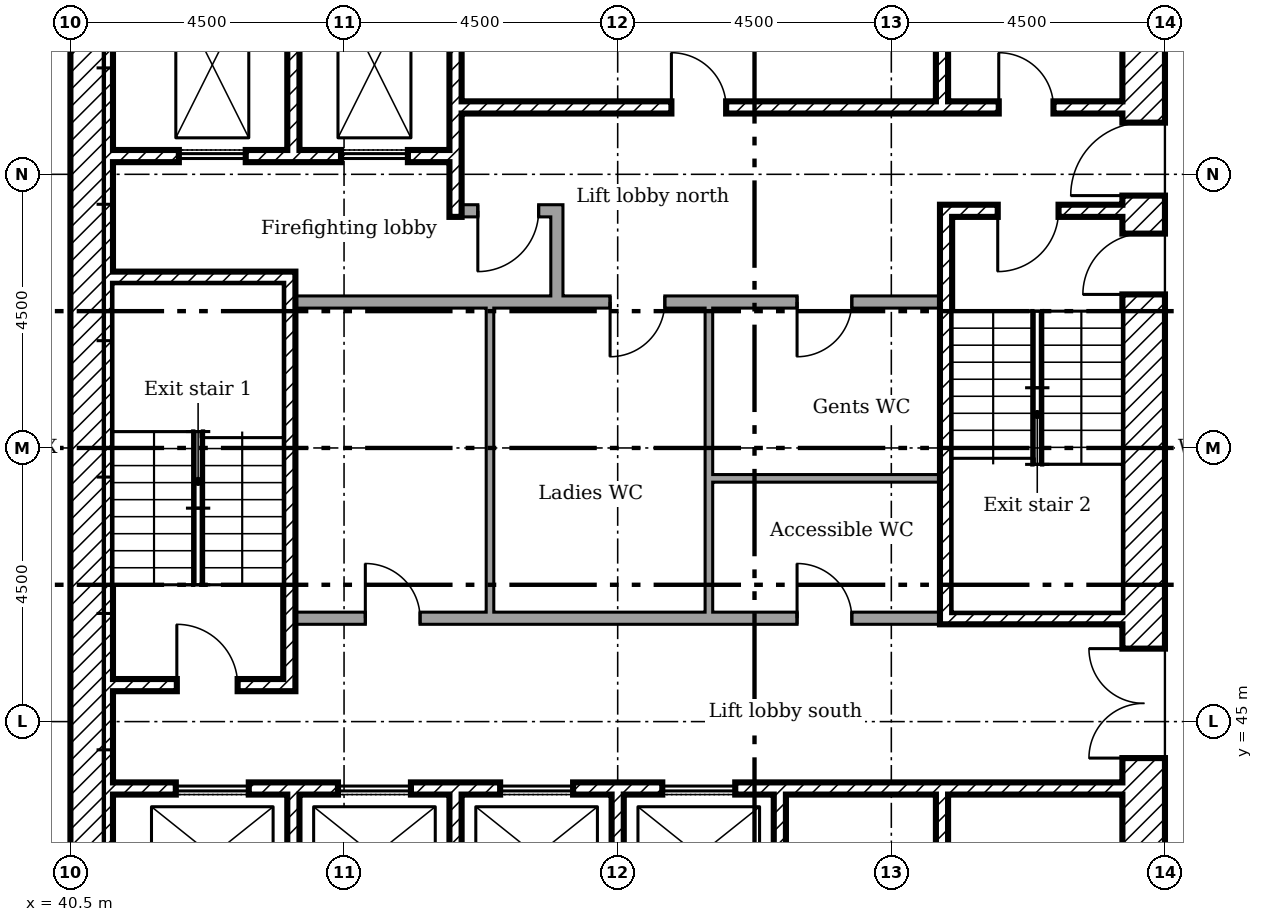
"""IFC4 building model, lengths in metres.
Left out: names, types, materials, properties, quantities, classifications, styles, units other than length and angle.
Written with IfcOpenShell. Run it as: python <this file> out.ifc"""

import sys

from ifc_helpers import new_model, si_unit, direction, frame, frame_2d, origin, place, context, subcontext, project, spatial, rectangle, extrude, element, fill, save


model = new_model("IFC4")
c1 = context("Model", 3, precision=1e-05, world=origin(), true_north=direction((0.0, 1.0)))
c2 = subcontext(c1, "Body", "Model", "MODEL_VIEW")
j1 = project(units=[si_unit("LENGTHUNIT", "METRE"), si_unit("PLANEANGLEUNIT", "RADIAN")], contexts=[c1])
p1 = place(None, origin())
s1 = spatial("IfcSite", under=j1, at=p1, CompositionType="ELEMENT")
p2 = place(p1, origin())
s2 = spatial("IfcBuilding", under=s1, at=p2, CompositionType="ELEMENT")
p3 = place(p2, frame((0.0, 0.0, 95.6)))
s3 = spatial("IfcBuildingStorey", under=s2, at=p3, CompositionType="ELEMENT", Elevation=95.6)
p4 = place(p3, frame((58.15, 40.5, 0.0), z_axis=(0.0, 0.0, 1.0), x_axis=(0.0, 1.0, 0.0)))
e1 = element("IfcWall", 1, at=p4, inside=s3, PredefinedType="SHEAR", context=c2, shape_type="SweptSolid", body=[
    extrude(rectangle(XDim=18.0, YDim=0.7, at=frame_2d((9.0, 0.0))), origin(), (0.0, 0.0, 1.0), 3.35),
])
p5 = place(p4, frame((13.15, 0.0, 0.0)))
e2 = element("IfcOpeningElement", 2, at=p5, cuts=e1, PredefinedType="OPENING", context=c2, shape_type="SweptSolid", body=[
    extrude(rectangle(XDim=1.2, YDim=2.1, at=frame_2d((0.6, 1.05))), frame((0.0, 0.36, 0.0), z_axis=(0.0, -1.0, 0.0), x_axis=(1.0, 0.0, 0.0)), (0.0, 0.0, 1.0), 0.72),
])
p6 = place(p4, frame((3.9, 0.0, 0.0)))
e3 = element("IfcOpeningElement", 3, at=p6, cuts=e1, PredefinedType="OPENING", context=c2, shape_type="SweptSolid", body=[
    extrude(rectangle(XDim=1.8, YDim=2.1, at=frame_2d((0.9, 1.05))), frame((0.0, 0.36, 0.0), z_axis=(0.0, -1.0, 0.0), x_axis=(1.0, 0.0, 0.0)), (0.0, 0.0, 1.0), 0.72),
])
p7 = place(p4, frame((11.525, 0.0, 0.0)))
e4 = element("IfcOpeningElement", 4, at=p7, cuts=e1, PredefinedType="OPENING", context=c2, shape_type="SweptSolid", body=[
    extrude(rectangle(XDim=1.0, YDim=2.1, at=frame_2d((0.5, 1.05))), frame((0.0, 0.36, 0.0), z_axis=(0.0, -1.0, 0.0), x_axis=(1.0, 0.0, 0.0)), (0.0, 0.0, 1.0), 0.72),
])
p8 = place(p3, frame((40.85, 40.5, 0.0), z_axis=(0.0, 0.0, 1.0), x_axis=(0.0, 1.0, 0.0)))
e5 = element("IfcWall", 5, at=p8, inside=s3, PredefinedType="SHEAR", context=c2, shape_type="SweptSolid", body=[
    extrude(rectangle(XDim=18.0, YDim=0.7, at=frame_2d((9.0, 0.0))), origin(), (0.0, 0.0, 1.0), 3.35),
])
p9 = place(p3, frame((44.167, 57.8, 0.0), z_axis=(0.0, 0.0, 1.0), x_axis=(0.0, -1.0, 0.0)))
e6 = element("IfcWall", 6, at=p9, inside=s3, PredefinedType="SHEAR", context=c2, shape_type="SweptSolid", body=[
    extrude(rectangle(XDim=3.4, YDim=0.2, at=frame_2d((1.7, 0.0))), origin(), (0.0, 0.0, 1.0), 3.35),
])
p10 = place(p3, frame((46.833, 57.8, 0.0), z_axis=(0.0, 0.0, 1.0), x_axis=(0.0, -1.0, 0.0)))
e7 = element("IfcWall", 7, at=p10, inside=s3, PredefinedType="SHEAR", context=c2, shape_type="SweptSolid", body=[
    extrude(rectangle(XDim=4.5, YDim=0.2, at=frame_2d((2.25, 0.0))), origin(), (0.0, 0.0, 1.0), 3.35),
])
for number, where, z_axis, x_axis in (
    (8, (54.833, 57.8, 0.0), (0.0, 0.0, 1.0), (0.0, -1.0, 0.0)),
    (9, (44.167, 41.2, 0.0), (0.0, 0.0, 1.0), (0.0, 1.0, 0.0)),
    (10, (46.833, 41.2, 0.0), (0.0, 0.0, 1.0), (0.0, 1.0, 0.0)),
    (11, (49.5, 41.2, 0.0), (0.0, 0.0, 1.0), (0.0, 1.0, 0.0)),
    (12, (52.167, 41.2, 0.0), (0.0, 0.0, 1.0), (0.0, 1.0, 0.0)),
    (13, (54.833, 41.2, 0.0), (0.0, 0.0, 1.0), (0.0, 1.0, 0.0)),
):
    element("IfcWall", number, at=place(p3, frame(where, z_axis=z_axis, x_axis=x_axis)), inside=s3, PredefinedType="SHEAR", context=c2, shape_type="SweptSolid", body=[
        extrude(rectangle(XDim=2.6, YDim=0.2, at=frame_2d((1.3, 0.0))), origin(), (0.0, 0.0, 1.0), 3.35),
    ])
p11 = place(p3, frame((48.5, 51.9, 0.0), z_axis=(0.0, 0.0, 1.0), x_axis=(0.0, 1.0, 0.0)))
e14 = element("IfcWall", 14, at=p11, inside=s3, PredefinedType="PARTITIONING", context=c2, shape_type="SweptSolid", body=[
    extrude(rectangle(XDim=1.6, YDim=0.2, at=frame_2d((0.8, 0.0))), origin(), (0.0, 0.0, 1.0), 3.35),
])
p12 = place(p3, frame((46.933, 53.4, 0.0)))
e15 = element("IfcWall", 15, at=p12, inside=s3, PredefinedType="PARTITIONING", context=c2, shape_type="SweptSolid", body=[
    extrude(rectangle(XDim=1.467, YDim=0.2, at=frame_2d((0.733, 0.0))), origin(), (0.0, 0.0, 1.0), 3.35),
])
p13 = place(p12, frame((0.267, 0.0, 0.0)))
e16 = element("IfcOpeningElement", 16, at=p13, cuts=e15, PredefinedType="OPENING", context=c2, shape_type="SweptSolid", body=[
    extrude(rectangle(XDim=1.0, YDim=2.1, at=frame_2d((0.5, 1.05))), frame((0.0, 0.11, 0.0), z_axis=(0.0, -1.0, 0.0), x_axis=(1.0, 0.0, 0.0)), (0.0, 0.0, 1.0), 0.22),
])
p14 = place(p3, frame((46.933, 55.1, 0.0)))
e17 = element("IfcWall", 17, at=p14, inside=s3, PredefinedType="SHEAR", context=c2, shape_type="SweptSolid", body=[
    extrude(rectangle(XDim=10.867, YDim=0.2, at=frame_2d((5.433, 0.0))), origin(), (0.0, 0.0, 1.0), 3.35),
])
p15 = place(p14, frame((8.833, 0.0, 0.0)))
e18 = element("IfcOpeningElement", 18, at=p15, cuts=e17, PredefinedType="OPENING", context=c2, shape_type="SweptSolid", body=[
    extrude(rectangle(XDim=0.9, YDim=2.1, at=frame_2d((0.45, 1.05))), frame((0.0, 0.11, 0.0), z_axis=(0.0, -1.0, 0.0), x_axis=(1.0, 0.0, 0.0)), (0.0, 0.0, 1.0), 0.22),
])
p16 = place(p14, frame((3.45, 0.0, 0.0)))
e19 = element("IfcOpeningElement", 19, at=p16, cuts=e17, PredefinedType="OPENING", context=c2, shape_type="SweptSolid", body=[
    extrude(rectangle(XDim=0.9, YDim=2.1, at=frame_2d((0.45, 1.05))), frame((0.0, 0.11, 0.0), z_axis=(0.0, -1.0, 0.0), x_axis=(1.0, 0.0, 0.0)), (0.0, 0.0, 1.0), 0.22),
])
p17 = place(p3, frame((41.2, 54.3, 0.0)))
e20 = element("IfcWall", 20, at=p17, inside=s3, PredefinedType="SHEAR", context=c2, shape_type="SweptSolid", body=[
    extrude(rectangle(XDim=5.533, YDim=0.2, at=frame_2d((2.767, 0.0))), origin(), (0.0, 0.0, 1.0), 3.35),
])
p18 = place(p17, frame((1.083, 0.0, 0.0)))
e21 = element("IfcOpeningElement", 21, at=p18, cuts=e20, PredefinedType="OPENING", context=c2, shape_type="SweptSolid", body=[
    extrude(rectangle(XDim=1.1, YDim=2.1, at=frame_2d((0.55, 1.05))), frame((0.0, 0.11, 0.0), z_axis=(0.0, -1.0, 0.0), x_axis=(1.0, 0.0, 0.0)), (0.0, 0.0, 1.0), 0.22),
])
p19 = place(p17, frame((3.75, 0.0, 0.0)))
e22 = element("IfcOpeningElement", 22, at=p19, cuts=e20, PredefinedType="OPENING", context=c2, shape_type="SweptSolid", body=[
    extrude(rectangle(XDim=1.1, YDim=2.1, at=frame_2d((0.55, 1.05))), frame((0.0, 0.11, 0.0), z_axis=(0.0, -1.0, 0.0), x_axis=(1.0, 0.0, 0.0)), (0.0, 0.0, 1.0), 0.22),
])
p20 = place(p3, frame((41.2, 43.9, 0.0)))
e23 = element("IfcWall", 23, at=p20, inside=s3, PredefinedType="SHEAR", context=c2, shape_type="SweptSolid", body=[
    extrude(rectangle(XDim=16.6, YDim=0.2, at=frame_2d((8.3, 0.0))), origin(), (0.0, 0.0, 1.0), 3.35),
])
p21 = place(p20, frame((1.033, 0.0, 0.0)))
e24 = element("IfcOpeningElement", 24, at=p21, cuts=e23, PredefinedType="OPENING", context=c2, shape_type="SweptSolid", body=[
    extrude(rectangle(XDim=1.2, YDim=2.1, at=frame_2d((0.6, 1.05))), frame((0.0, 0.11, 0.0), z_axis=(0.0, -1.0, 0.0), x_axis=(1.0, 0.0, 0.0)), (0.0, 0.0, 1.0), 0.22),
])
p22 = place(p20, frame((3.7, 0.0, 0.0)))
e25 = element("IfcOpeningElement", 25, at=p22, cuts=e23, PredefinedType="OPENING", context=c2, shape_type="SweptSolid", body=[
    extrude(rectangle(XDim=1.2, YDim=2.1, at=frame_2d((0.6, 1.05))), frame((0.0, 0.11, 0.0), z_axis=(0.0, -1.0, 0.0), x_axis=(1.0, 0.0, 0.0)), (0.0, 0.0, 1.0), 0.22),
])
p23 = place(p20, frame((6.367, 0.0, 0.0)))
e26 = element("IfcOpeningElement", 26, at=p23, cuts=e23, PredefinedType="OPENING", context=c2, shape_type="SweptSolid", body=[
    extrude(rectangle(XDim=1.2, YDim=2.1, at=frame_2d((0.6, 1.05))), frame((0.0, 0.11, 0.0), z_axis=(0.0, -1.0, 0.0), x_axis=(1.0, 0.0, 0.0)), (0.0, 0.0, 1.0), 0.22),
])
p24 = place(p20, frame((9.033, 0.0, 0.0)))
e27 = element("IfcOpeningElement", 27, at=p24, cuts=e23, PredefinedType="OPENING", context=c2, shape_type="SweptSolid", body=[
    extrude(rectangle(XDim=1.2, YDim=2.1, at=frame_2d((0.6, 1.05))), frame((0.0, 0.11, 0.0), z_axis=(0.0, -1.0, 0.0), x_axis=(1.0, 0.0, 0.0)), (0.0, 0.0, 1.0), 0.22),
])
p25 = place(p3, frame((44.1, 45.5, 0.0), z_axis=(0.0, 0.0, 1.0), x_axis=(0.0, 1.0, 0.0)))
e28 = element("IfcWall", 28, at=p25, inside=s3, PredefinedType="SHEAR", context=c2, shape_type="SweptSolid", body=[
    extrude(rectangle(XDim=6.9, YDim=0.2, at=frame_2d((3.45, 0.0))), origin(), (0.0, 0.0, 1.0), 3.35),
])
p26 = place(p3, frame((41.2, 52.3, 0.0)))
e29 = element("IfcWall", 29, at=p26, inside=s3, PredefinedType="SHEAR", context=c2, shape_type="SweptSolid", body=[
    extrude(rectangle(XDim=2.8, YDim=0.2, at=frame_2d((1.4, 0.0))), origin(), (0.0, 0.0, 1.0), 3.35),
])
p27 = place(p3, frame((41.2, 45.6, 0.0)))
e30 = element("IfcWall", 30, at=p27, inside=s3, PredefinedType="SHEAR", context=c2, shape_type="SweptSolid", body=[
    extrude(rectangle(XDim=2.8, YDim=0.2, at=frame_2d((1.4, 0.0))), origin(), (0.0, 0.0, 1.0), 3.35),
])
p28 = place(p27, frame((1.05, 0.0, 0.0)))
e31 = element("IfcOpeningElement", 31, at=p28, cuts=e30, PredefinedType="OPENING", context=c2, shape_type="SweptSolid", body=[
    extrude(rectangle(XDim=1.0, YDim=2.1, at=frame_2d((0.5, 1.05))), frame((0.0, 0.11, 0.0), z_axis=(0.0, -1.0, 0.0), x_axis=(1.0, 0.0, 0.0)), (0.0, 0.0, 1.0), 0.22),
])
p29 = place(p3, frame((54.8, 53.4, 0.0)))
e32 = element("IfcWall", 32, at=p29, inside=s3, PredefinedType="SHEAR", context=c2, shape_type="SweptSolid", body=[
    extrude(rectangle(XDim=3.0, YDim=0.2, at=frame_2d((1.5, 0.0))), origin(), (0.0, 0.0, 1.0), 3.35),
])
p30 = place(p29, frame((0.95, 0.0, 0.0)))
e33 = element("IfcOpeningElement", 33, at=p30, cuts=e32, PredefinedType="OPENING", context=c2, shape_type="SweptSolid", body=[
    extrude(rectangle(XDim=1.0, YDim=2.1, at=frame_2d((0.5, 1.05))), frame((0.0, 0.11, 0.0), z_axis=(0.0, -1.0, 0.0), x_axis=(1.0, 0.0, 0.0)), (0.0, 0.0, 1.0), 0.22),
])
p31 = place(p3, frame((54.8, 46.7, 0.0)))
e34 = element("IfcWall", 34, at=p31, inside=s3, PredefinedType="SHEAR", context=c2, shape_type="SweptSolid", body=[
    extrude(rectangle(XDim=3.0, YDim=0.2, at=frame_2d((1.5, 0.0))), origin(), (0.0, 0.0, 1.0), 3.35),
])
p32 = place(p3, frame((54.9, 46.8, 0.0), z_axis=(0.0, 0.0, 1.0), x_axis=(0.0, 1.0, 0.0)))
e35 = element("IfcWall", 35, at=p32, inside=s3, PredefinedType="SHEAR", context=c2, shape_type="SweptSolid", body=[
    extrude(rectangle(XDim=6.5, YDim=0.2, at=frame_2d((3.25, 0.0))), origin(), (0.0, 0.0, 1.0), 3.35),
])
p33 = place(p3, frame((44.2, 51.9, 0.0)))
e36 = element("IfcWall", 36, at=p33, inside=s3, PredefinedType="PARTITIONING", context=c2, shape_type="SweptSolid", body=[
    extrude(rectangle(XDim=10.6, YDim=0.2, at=frame_2d((5.3, 0.0))), origin(), (0.0, 0.0, 1.0), 3.35),
])
p34 = place(p33, frame((5.175, 0.0, 0.0)))
e37 = element("IfcOpeningElement", 37, at=p34, cuts=e36, PredefinedType="OPENING", context=c2, shape_type="SweptSolid", body=[
    extrude(rectangle(XDim=0.9, YDim=2.1, at=frame_2d((0.45, 1.05))), frame((0.0, 0.11, 0.0), z_axis=(0.0, -1.0, 0.0), x_axis=(1.0, 0.0, 0.0)), (0.0, 0.0, 1.0), 0.22),
])
p35 = place(p33, frame((8.25, 0.0, 0.0)))
e38 = element("IfcOpeningElement", 38, at=p35, cuts=e36, PredefinedType="OPENING", context=c2, shape_type="SweptSolid", body=[
    extrude(rectangle(XDim=0.9, YDim=2.1, at=frame_2d((0.45, 1.05))), frame((0.0, 0.11, 0.0), z_axis=(0.0, -1.0, 0.0), x_axis=(1.0, 0.0, 0.0)), (0.0, 0.0, 1.0), 0.22),
])
p36 = place(p3, frame((44.2, 46.7, 0.0)))
e39 = element("IfcWall", 39, at=p36, inside=s3, PredefinedType="PARTITIONING", context=c2, shape_type="SweptSolid", body=[
    extrude(rectangle(XDim=10.6, YDim=0.2, at=frame_2d((5.3, 0.0))), origin(), (0.0, 0.0, 1.0), 3.35),
])
p37 = place(p36, frame((1.15, 0.0, 0.0)))
e40 = element("IfcOpeningElement", 40, at=p37, cuts=e39, PredefinedType="OPENING", context=c2, shape_type="SweptSolid", body=[
    extrude(rectangle(XDim=0.9, YDim=2.1, at=frame_2d((0.45, 1.05))), frame((0.0, 0.11, 0.0), z_axis=(0.0, -1.0, 0.0), x_axis=(1.0, 0.0, 0.0)), (0.0, 0.0, 1.0), 0.22),
])
p38 = place(p36, frame((8.25, 0.0, 0.0)))
e41 = element("IfcOpeningElement", 41, at=p38, cuts=e39, PredefinedType="OPENING", context=c2, shape_type="SweptSolid", body=[
    extrude(rectangle(XDim=0.9, YDim=2.1, at=frame_2d((0.45, 1.05))), frame((0.0, 0.11, 0.0), z_axis=(0.0, -1.0, 0.0), x_axis=(1.0, 0.0, 0.0)), (0.0, 0.0, 1.0), 0.22),
])
p39 = place(p3, frame((47.4, 46.8, 0.0), z_axis=(0.0, 0.0, 1.0), x_axis=(0.0, 1.0, 0.0)))
e42 = element("IfcWall", 42, at=p39, inside=s3, PredefinedType="PARTITIONING", context=c2, shape_type="SweptSolid", body=[
    extrude(rectangle(XDim=5.0, YDim=0.125, at=frame_2d((2.5, 0.0))), origin(), (0.0, 0.0, 1.0), 3.35),
])
p40 = place(p3, frame((51.0, 46.8, 0.0), z_axis=(0.0, 0.0, 1.0), x_axis=(0.0, 1.0, 0.0)))
e43 = element("IfcWall", 43, at=p40, inside=s3, PredefinedType="PARTITIONING", context=c2, shape_type="SweptSolid", body=[
    extrude(rectangle(XDim=2.262, YDim=0.125, at=frame_2d((1.131, 0.0))), origin(), (0.0, 0.0, 1.0), 3.35),
])
p41 = place(p3, frame((54.8, 49.0, 0.0), z_axis=(0.0, 0.0, 1.0), x_axis=(-1.0, 0.0, 0.0)))
e44 = element("IfcWall", 44, at=p41, inside=s3, PredefinedType="PARTITIONING", context=c2, shape_type="SweptSolid", body=[
    extrude(rectangle(XDim=3.738, YDim=0.125, at=frame_2d((1.869, 0.0))), origin(), (0.0, 0.0, 1.0), 3.35),
])
p42 = place(p3, frame((51.0, 49.0, 0.0), z_axis=(0.0, 0.0, 1.0), x_axis=(0.0, 1.0, 0.0)))
e45 = element("IfcWall", 45, at=p42, inside=s3, PredefinedType="PARTITIONING", context=c2, shape_type="SweptSolid", body=[
    extrude(rectangle(XDim=2.8, YDim=0.125, at=frame_2d((1.4, 0.0))), origin(), (0.0, 0.0, 1.0), 3.35),
])
p43 = place(p5, origin())
e46 = element("IfcDoor", 46, at=p43, inside=s3, OperationType="SINGLE_SWING_RIGHT", PredefinedType="DOOR", context=c2, shape_type="SweptSolid", body=[
    extrude(rectangle(XDim=1.2, YDim=2.1, at=frame_2d((0.6, 1.05))), frame((0.0, 0.025, 0.0), z_axis=(0.0, -1.0, 0.0), x_axis=(1.0, 0.0, 0.0)), (0.0, 0.0, 1.0), 0.05),
])
fill(e2, e46)
p44 = place(p6, origin())
e47 = element("IfcDoor", 47, at=p44, inside=s3, OperationType="DOUBLE_DOOR_SINGLE_SWING", PredefinedType="DOOR", context=c2, shape_type="SweptSolid", body=[
    extrude(rectangle(XDim=1.8, YDim=2.1, at=frame_2d((0.9, 1.05))), frame((0.0, 0.025, 0.0), z_axis=(0.0, -1.0, 0.0), x_axis=(1.0, 0.0, 0.0)), (0.0, 0.0, 1.0), 0.05),
])
fill(e3, e47)
p45 = place(p28, origin())
e48 = element("IfcDoor", 48, at=p45, inside=s3, OperationType="SINGLE_SWING_RIGHT", PredefinedType="DOOR", context=c2, shape_type="SweptSolid", body=[
    extrude(rectangle(XDim=1.0, YDim=2.1, at=frame_2d((0.5, 1.05))), frame((0.0, 0.025, 0.0), z_axis=(0.0, -1.0, 0.0), x_axis=(1.0, 0.0, 0.0)), (0.0, 0.0, 1.0), 0.05),
])
fill(e31, e48)
p46 = place(p30, frame((1.0, 0.0, 0.0), x_axis=(-1.0, 0.0, 0.0)))
e49 = element("IfcDoor", 49, at=p46, inside=s3, OperationType="SINGLE_SWING_LEFT", PredefinedType="DOOR", context=c2, shape_type="SweptSolid", body=[
    extrude(rectangle(XDim=1.0, YDim=2.1, at=frame_2d((0.5, 1.05))), frame((0.0, 0.025, 0.0), z_axis=(0.0, -1.0, 0.0), x_axis=(1.0, 0.0, 0.0)), (0.0, 0.0, 1.0), 0.05),
])
fill(e33, e49)
p47 = place(p7, origin())
e50 = element("IfcDoor", 50, at=p47, inside=s3, OperationType="SINGLE_SWING_RIGHT", PredefinedType="DOOR", context=c2, shape_type="SweptSolid", body=[
    extrude(rectangle(XDim=1.0, YDim=2.1, at=frame_2d((0.5, 1.05))), frame((0.0, 0.025, 0.0), z_axis=(0.0, -1.0, 0.0), x_axis=(1.0, 0.0, 0.0)), (0.0, 0.0, 1.0), 0.05),
])
fill(e4, e50)
p48 = place(p13, frame((1.0, 0.0, 0.0), x_axis=(-1.0, 0.0, 0.0)))
e51 = element("IfcDoor", 51, at=p48, inside=s3, OperationType="SINGLE_SWING_LEFT", PredefinedType="DOOR", context=c2, shape_type="SweptSolid", body=[
    extrude(rectangle(XDim=1.0, YDim=2.1, at=frame_2d((0.5, 1.05))), frame((0.0, 0.025, 0.0), z_axis=(0.0, -1.0, 0.0), x_axis=(1.0, 0.0, 0.0)), (0.0, 0.0, 1.0), 0.05),
])
fill(e16, e51)
p49 = place(p15, origin())
e52 = element("IfcDoor", 52, at=p49, inside=s3, OperationType="SINGLE_SWING_RIGHT", PredefinedType="DOOR", context=c2, shape_type="SweptSolid", body=[
    extrude(rectangle(XDim=0.9, YDim=2.1, at=frame_2d((0.45, 1.05))), frame((0.0, 0.025, 0.0), z_axis=(0.0, -1.0, 0.0), x_axis=(1.0, 0.0, 0.0)), (0.0, 0.0, 1.0), 0.05),
])
fill(e18, e52)
p50 = place(p16, origin())
e53 = element("IfcDoor", 53, at=p50, inside=s3, OperationType="SINGLE_SWING_RIGHT", PredefinedType="DOOR", context=c2, shape_type="SweptSolid", body=[
    extrude(rectangle(XDim=0.9, YDim=2.1, at=frame_2d((0.45, 1.05))), frame((0.0, 0.025, 0.0), z_axis=(0.0, -1.0, 0.0), x_axis=(1.0, 0.0, 0.0)), (0.0, 0.0, 1.0), 0.05),
])
fill(e19, e53)
p51 = place(p37, origin())
e54 = element("IfcDoor", 54, at=p51, inside=s3, OperationType="SINGLE_SWING_RIGHT", PredefinedType="DOOR", context=c2, shape_type="SweptSolid", body=[
    extrude(rectangle(XDim=0.9, YDim=2.1, at=frame_2d((0.45, 1.05))), frame((0.0, 0.025, 0.0), z_axis=(0.0, -1.0, 0.0), x_axis=(1.0, 0.0, 0.0)), (0.0, 0.0, 1.0), 0.05),
])
fill(e40, e54)
p52 = place(p34, frame((0.9, 0.0, 0.0), x_axis=(-1.0, 0.0, 0.0)))
e55 = element("IfcDoor", 55, at=p52, inside=s3, OperationType="SINGLE_SWING_LEFT", PredefinedType="DOOR", context=c2, shape_type="SweptSolid", body=[
    extrude(rectangle(XDim=0.9, YDim=2.1, at=frame_2d((0.45, 1.05))), frame((0.0, 0.025, 0.0), z_axis=(0.0, -1.0, 0.0), x_axis=(1.0, 0.0, 0.0)), (0.0, 0.0, 1.0), 0.05),
])
fill(e37, e55)
p53 = place(p38, origin())
e56 = element("IfcDoor", 56, at=p53, inside=s3, OperationType="SINGLE_SWING_RIGHT", PredefinedType="DOOR", context=c2, shape_type="SweptSolid", body=[
    extrude(rectangle(XDim=0.9, YDim=2.1, at=frame_2d((0.45, 1.05))), frame((0.0, 0.025, 0.0), z_axis=(0.0, -1.0, 0.0), x_axis=(1.0, 0.0, 0.0)), (0.0, 0.0, 1.0), 0.05),
])
fill(e41, e56)
p54 = place(p35, frame((0.9, 0.0, 0.0), x_axis=(-1.0, 0.0, 0.0)))
e57 = element("IfcDoor", 57, at=p54, inside=s3, OperationType="SINGLE_SWING_LEFT", PredefinedType="DOOR", context=c2, shape_type="SweptSolid", body=[
    extrude(rectangle(XDim=0.9, YDim=2.1, at=frame_2d((0.45, 1.05))), frame((0.0, 0.025, 0.0), z_axis=(0.0, -1.0, 0.0), x_axis=(1.0, 0.0, 0.0)), (0.0, 0.0, 1.0), 0.05),
])
fill(e38, e57)
p55 = place(p18, origin())
e58 = element("IfcDoor", 58, at=p55, inside=s3, OperationType="SLIDING_TO_LEFT", PredefinedType="DOOR", context=c2, shape_type="SweptSolid", body=[
    extrude(rectangle(XDim=1.1, YDim=2.1, at=frame_2d((0.55, 1.05))), frame((0.0, 0.025, 0.0), z_axis=(0.0, -1.0, 0.0), x_axis=(1.0, 0.0, 0.0)), (0.0, 0.0, 1.0), 0.05),
])
fill(e21, e58)
p56 = place(p19, origin())
e59 = element("IfcDoor", 59, at=p56, inside=s3, OperationType="SLIDING_TO_LEFT", PredefinedType="DOOR", context=c2, shape_type="SweptSolid", body=[
    extrude(rectangle(XDim=1.1, YDim=2.1, at=frame_2d((0.55, 1.05))), frame((0.0, 0.025, 0.0), z_axis=(0.0, -1.0, 0.0), x_axis=(1.0, 0.0, 0.0)), (0.0, 0.0, 1.0), 0.05),
])
fill(e22, e59)
p57 = place(p21, origin())
e60 = element("IfcDoor", 60, at=p57, inside=s3, OperationType="SLIDING_TO_LEFT", PredefinedType="DOOR", context=c2, shape_type="SweptSolid", body=[
    extrude(rectangle(XDim=1.2, YDim=2.1, at=frame_2d((0.6, 1.05))), frame((0.0, 0.025, 0.0), z_axis=(0.0, -1.0, 0.0), x_axis=(1.0, 0.0, 0.0)), (0.0, 0.0, 1.0), 0.05),
])
fill(e24, e60)
p58 = place(p22, origin())
e61 = element("IfcDoor", 61, at=p58, inside=s3, OperationType="SLIDING_TO_LEFT", PredefinedType="DOOR", context=c2, shape_type="SweptSolid", body=[
    extrude(rectangle(XDim=1.2, YDim=2.1, at=frame_2d((0.6, 1.05))), frame((0.0, 0.025, 0.0), z_axis=(0.0, -1.0, 0.0), x_axis=(1.0, 0.0, 0.0)), (0.0, 0.0, 1.0), 0.05),
])
fill(e25, e61)
p59 = place(p23, origin())
e62 = element("IfcDoor", 62, at=p59, inside=s3, OperationType="SLIDING_TO_LEFT", PredefinedType="DOOR", context=c2, shape_type="SweptSolid", body=[
    extrude(rectangle(XDim=1.2, YDim=2.1, at=frame_2d((0.6, 1.05))), frame((0.0, 0.025, 0.0), z_axis=(0.0, -1.0, 0.0), x_axis=(1.0, 0.0, 0.0)), (0.0, 0.0, 1.0), 0.05),
])
fill(e26, e62)
p60 = place(p24, origin())
e63 = element("IfcDoor", 63, at=p60, inside=s3, OperationType="SLIDING_TO_LEFT", PredefinedType="DOOR", context=c2, shape_type="SweptSolid", body=[
    extrude(rectangle(XDim=1.2, YDim=2.1, at=frame_2d((0.6, 1.05))), frame((0.0, 0.025, 0.0), z_axis=(0.0, -1.0, 0.0), x_axis=(1.0, 0.0, 0.0)), (0.0, 0.0, 1.0), 0.05),
])
fill(e27, e63)
save(model, sys.argv[1])
